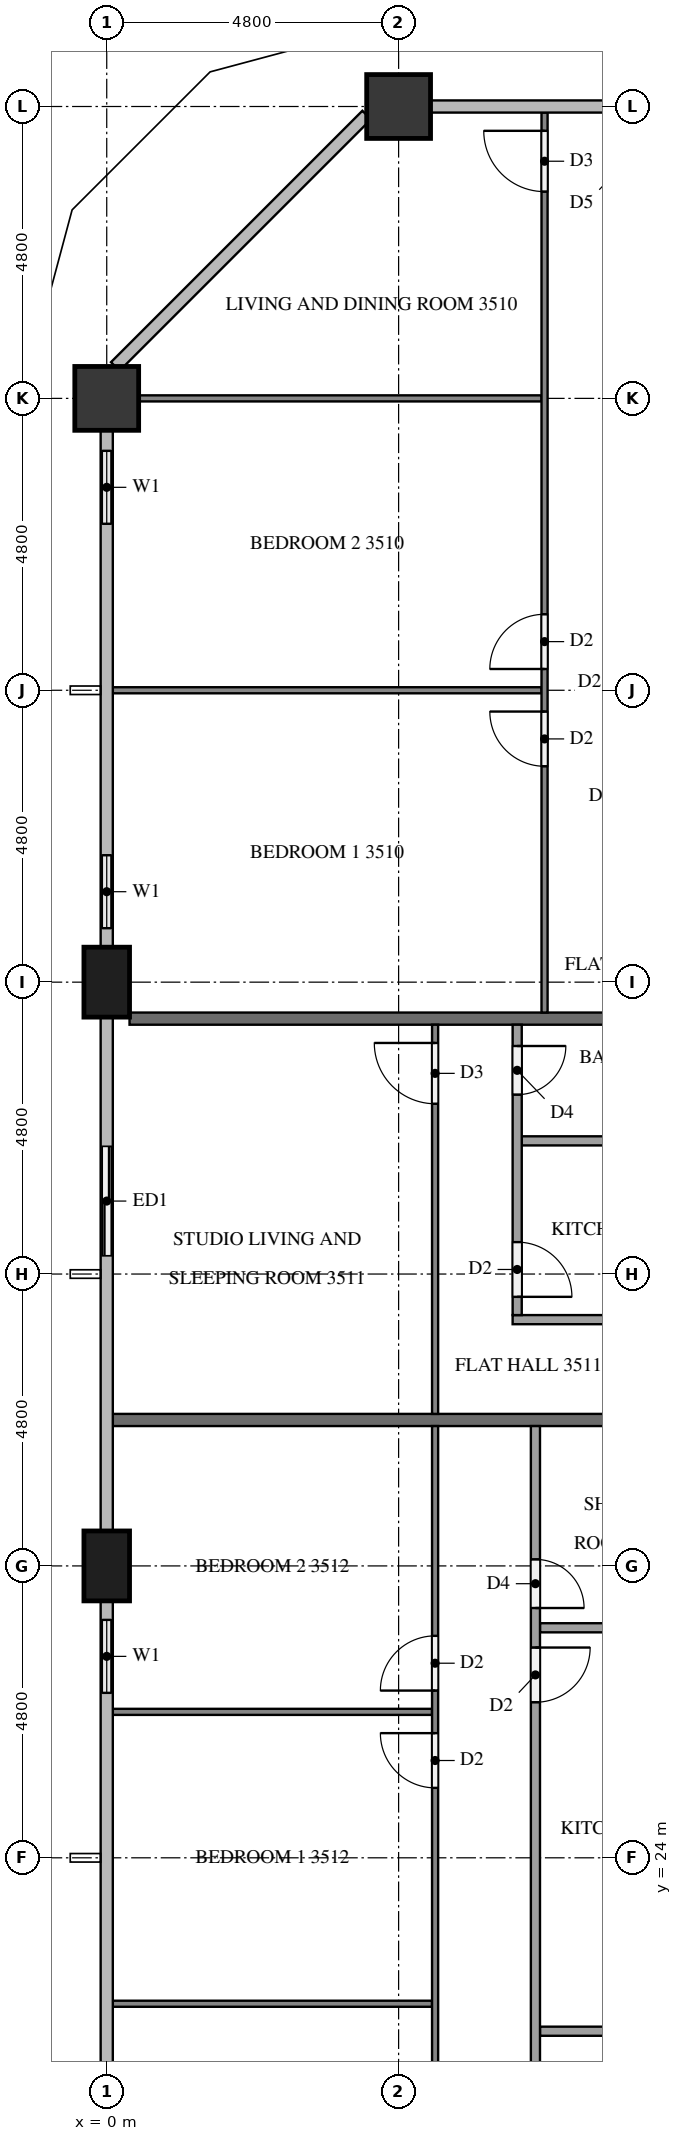
"""IFC4 building model, lengths in metres.
Left out: names, types, materials, properties, quantities, classifications, styles, units other than length and angle.
Written with IfcOpenShell. Run it as: python <this file> out.ifc"""

import sys

from ifc_helpers import new_model, si_unit, direction, frame, frame_2d, origin, origin_2d, place, context, subcontext, project, spatial, rectangle, extrude, element, fill, save


model = new_model("IFC4")
c1 = context("Model", 3, precision=1e-05, world=origin(), true_north=direction((0.0, 1.0)))
c2 = subcontext(c1, "Body", "Model", "MODEL_VIEW")
j1 = project(units=[si_unit("LENGTHUNIT", "METRE"), si_unit("PLANEANGLEUNIT", "RADIAN")], contexts=[c1])
p1 = place(None, origin())
s1 = spatial("IfcSite", under=j1, at=p1, CompositionType="ELEMENT")
p2 = place(p1, origin())
s2 = spatial("IfcBuilding", under=s1, at=p2, CompositionType="ELEMENT")
p3 = place(p2, frame((0.0, 0.0, 136.6)))
s3 = spatial("IfcBuildingStorey", under=s2, at=p3, CompositionType="ELEMENT", Elevation=136.6)
for number, where, z_axis, x_axis in (
    (1, (4.8, 52.8, 0.0), (0.0, 0.0, 1.0), (1.0, 0.0, 0.0)),
    (2, (0.0, 48.0, 0.0), (0.0, 0.0, 1.0), (1.0, 0.0, 0.0)),
):
    element("IfcColumn", number, at=place(p3, frame(where, z_axis=z_axis, x_axis=x_axis)), inside=s3, PredefinedType="COLUMN", context=c2, shape_type="SweptSolid", body=[
        extrude(rectangle(XDim=1.05, YDim=1.05, at=origin_2d()), origin(), (0.0, 0.0, 1.0), 3.2),
    ])
for number, where, z_axis, x_axis in (
    (3, (0.0, 38.4, 0.0), (0.0, 0.0, 1.0), (0.0, 1.0, 0.0)),
    (4, (0.0, 28.8, 0.0), (0.0, 0.0, 1.0), (0.0, 1.0, 0.0)),
):
    element("IfcColumn", number, at=place(p3, frame(where, z_axis=z_axis, x_axis=x_axis)), inside=s3, PredefinedType="COLUMN", context=c2, shape_type="SweptSolid", body=[
        extrude(rectangle(XDim=1.15, YDim=0.75, at=origin_2d()), origin(), (0.0, 0.0, 1.0), 3.2),
    ])
p4 = place(p3, frame((0.0, 47.475, 0.0), z_axis=(0.0, 0.0, 1.0), x_axis=(0.0, -1.0, 0.0)))
e5 = element("IfcWall", 5, at=p4, inside=s3, PredefinedType="SOLIDWALL", context=c2, shape_type="SweptSolid", body=[
    extrude(rectangle(XDim=1.875, YDim=0.15, at=frame_2d((0.938, 0.0))), origin(), (0.0, 0.0, 1.0), 3.2),
])
p5 = place(p4, frame((0.337, 0.0, 0.9)))
e6 = element("IfcOpeningElement", 6, at=p5, cuts=e5, PredefinedType="OPENING", context=c2, shape_type="SweptSolid", body=[
    extrude(rectangle(XDim=1.2, YDim=1.4, at=frame_2d((0.6, 0.7))), frame((0.0, 0.085, 0.0), z_axis=(0.0, -1.0, 0.0), x_axis=(1.0, 0.0, 0.0)), (0.0, 0.0, 1.0), 0.17),
])
p6 = place(p3, frame((0.0, 40.8, 0.0), z_axis=(0.0, 0.0, 1.0), x_axis=(0.0, -1.0, 0.0)))
e7 = element("IfcWall", 7, at=p6, inside=s3, PredefinedType="SOLIDWALL", context=c2, shape_type="SweptSolid", body=[
    extrude(rectangle(XDim=1.825, YDim=0.15, at=frame_2d((0.913, 0.0))), origin(), (0.0, 0.0, 1.0), 3.2),
])
p7 = place(p6, frame((0.312, 0.0, 0.9)))
e8 = element("IfcOpeningElement", 8, at=p7, cuts=e7, PredefinedType="OPENING", context=c2, shape_type="SweptSolid", body=[
    extrude(rectangle(XDim=1.2, YDim=1.4, at=frame_2d((0.6, 0.7))), frame((0.0, 0.085, 0.0), z_axis=(0.0, -1.0, 0.0), x_axis=(1.0, 0.0, 0.0)), (0.0, 0.0, 1.0), 0.17),
])
p8 = place(p3, frame((0.0, 36.0, 0.0), z_axis=(0.0, 0.0, 1.0), x_axis=(0.0, -1.0, 0.0)))
e9 = element("IfcWall", 9, at=p8, inside=s3, PredefinedType="SOLIDWALL", context=c2, shape_type="SweptSolid", body=[
    extrude(rectangle(XDim=2.4, YDim=0.15, at=frame_2d((1.2, 0.0))), origin(), (0.0, 0.0, 1.0), 3.2),
])
p9 = place(p8, frame((0.3, 0.0, 0.0)))
e10 = element("IfcOpeningElement", 10, at=p9, cuts=e9, PredefinedType="OPENING", context=c2, shape_type="SweptSolid", body=[
    extrude(rectangle(XDim=1.8, YDim=2.4, at=frame_2d((0.9, 1.2))), frame((0.0, 0.085, 0.0), z_axis=(0.0, -1.0, 0.0), x_axis=(1.0, 0.0, 0.0)), (0.0, 0.0, 1.0), 0.17),
])
p10 = place(p3, frame((0.0, 28.225, 0.0), z_axis=(0.0, 0.0, 1.0), x_axis=(0.0, -1.0, 0.0)))
e11 = element("IfcWall", 11, at=p10, inside=s3, PredefinedType="SOLIDWALL", context=c2, shape_type="SweptSolid", body=[
    extrude(rectangle(XDim=1.825, YDim=0.15, at=frame_2d((0.913, 0.0))), origin(), (0.0, 0.0, 1.0), 3.2),
])
p11 = place(p10, frame((0.312, 0.0, 0.9)))
e12 = element("IfcOpeningElement", 12, at=p11, cuts=e11, PredefinedType="OPENING", context=c2, shape_type="SweptSolid", body=[
    extrude(rectangle(XDim=1.2, YDim=1.4, at=frame_2d((0.6, 0.7))), frame((0.0, 0.085, 0.0), z_axis=(0.0, -1.0, 0.0), x_axis=(1.0, 0.0, 0.0)), (0.0, 0.0, 1.0), 0.17),
])
p12 = place(p3, frame((0.375, 37.8, 0.0), z_axis=(0.0, 0.0, 1.0), x_axis=(1.0, 0.0, 0.0)))
e13 = element("IfcWall", 13, at=p12, inside=s3, PredefinedType="PARTITIONING", context=c2, shape_type="SweptSolid", body=[
    extrude(rectangle(XDim=9.525, YDim=0.2, at=frame_2d((4.762, 0.0))), origin(), (0.0, 0.0, 1.0), 3.2),
])
p13 = place(p3, frame((0.1, 31.2, 0.0), z_axis=(0.0, 0.0, 1.0), x_axis=(1.0, 0.0, 0.0)))
e14 = element("IfcWall", 14, at=p13, inside=s3, PredefinedType="PARTITIONING", context=c2, shape_type="SweptSolid", body=[
    extrude(rectangle(XDim=9.8, YDim=0.2, at=frame_2d((4.9, 0.0))), origin(), (0.0, 0.0, 1.0), 3.2),
])
p14 = place(p3, frame((7.15, 43.2, 0.0), z_axis=(0.0, 0.0, 1.0), x_axis=(-1.0, 0.0, 0.0)))
e15 = element("IfcWall", 15, at=p14, inside=s3, PredefinedType="PARTITIONING", context=c2, shape_type="SweptSolid", body=[
    extrude(rectangle(XDim=7.05, YDim=0.1, at=frame_2d((3.525, 0.0))), origin(), (0.0, 0.0, 1.0), 3.2),
])
p15 = place(p3, frame((7.15, 48.0, 0.0), z_axis=(0.0, 0.0, 1.0), x_axis=(-1.0, 0.0, 0.0)))
e16 = element("IfcWall", 16, at=p15, inside=s3, PredefinedType="PARTITIONING", context=c2, shape_type="SweptSolid", body=[
    extrude(rectangle(XDim=6.625, YDim=0.1, at=frame_2d((3.312, 0.0))), origin(), (0.0, 0.0, 1.0), 3.2),
])
p16 = place(p3, frame((7.2, 37.9, 0.0), z_axis=(0.0, 0.0, 1.0), x_axis=(0.0, 1.0, 0.0)))
e17 = element("IfcWall", 17, at=p16, inside=s3, PredefinedType="PARTITIONING", context=c2, shape_type="SweptSolid", body=[
    extrude(rectangle(XDim=14.8, YDim=0.1, at=frame_2d((7.4, 0.0))), origin(), (0.0, 0.0, 1.0), 3.2),
])
p17 = place(p16, frame((4.05, 0.0, 0.0)))
e18 = element("IfcOpeningElement", 18, at=p17, cuts=e17, PredefinedType="OPENING", context=c2, shape_type="SweptSolid", body=[
    extrude(rectangle(XDim=0.9, YDim=2.1, at=frame_2d((0.45, 1.05))), frame((0.0, 0.06, 0.0), z_axis=(0.0, -1.0, 0.0), x_axis=(1.0, 0.0, 0.0)), (0.0, 0.0, 1.0), 0.12),
])
p18 = place(p16, frame((5.65, 0.0, 0.0)))
e19 = element("IfcOpeningElement", 19, at=p18, cuts=e17, PredefinedType="OPENING", context=c2, shape_type="SweptSolid", body=[
    extrude(rectangle(XDim=0.9, YDim=2.1, at=frame_2d((0.45, 1.05))), frame((0.0, 0.06, 0.0), z_axis=(0.0, -1.0, 0.0), x_axis=(1.0, 0.0, 0.0)), (0.0, 0.0, 1.0), 0.12),
])
p19 = place(p16, frame((13.5, 0.0, 0.0)))
e20 = element("IfcOpeningElement", 20, at=p19, cuts=e17, PredefinedType="OPENING", context=c2, shape_type="SweptSolid", body=[
    extrude(rectangle(XDim=1.0, YDim=2.1, at=frame_2d((0.5, 1.05))), frame((0.0, 0.06, 0.0), z_axis=(0.0, -1.0, 0.0), x_axis=(1.0, 0.0, 0.0)), (0.0, 0.0, 1.0), 0.12),
])
p20 = place(p3, frame((5.4, 31.3, 0.0), z_axis=(0.0, 0.0, 1.0), x_axis=(0.0, 1.0, 0.0)))
e21 = element("IfcWall", 21, at=p20, inside=s3, PredefinedType="PARTITIONING", context=c2, shape_type="SweptSolid", body=[
    extrude(rectangle(XDim=6.4, YDim=0.1, at=frame_2d((3.2, 0.0))), origin(), (0.0, 0.0, 1.0), 3.2),
])
p21 = place(p20, frame((5.1, 0.0, 0.0)))
e22 = element("IfcOpeningElement", 22, at=p21, cuts=e21, PredefinedType="OPENING", context=c2, shape_type="SweptSolid", body=[
    extrude(rectangle(XDim=1.0, YDim=2.1, at=frame_2d((0.5, 1.05))), frame((0.0, 0.06, 0.0), z_axis=(0.0, -1.0, 0.0), x_axis=(1.0, 0.0, 0.0)), (0.0, 0.0, 1.0), 0.12),
])
p22 = place(p3, frame((9.9, 35.79, 0.0), z_axis=(0.0, 0.0, 1.0), x_axis=(-1.0, 0.0, 0.0)))
e23 = element("IfcWall", 23, at=p22, inside=s3, PredefinedType="PARTITIONING", context=c2, shape_type="SweptSolid", body=[
    extrude(rectangle(XDim=3.075, YDim=0.15, at=frame_2d((1.538, 0.0))), origin(), (0.0, 0.0, 1.0), 3.2),
])
p23 = place(p3, frame((9.9, 32.85, 0.0), z_axis=(0.0, 0.0, 1.0), x_axis=(-1.0, 0.0, 0.0)))
e24 = element("IfcWall", 24, at=p23, inside=s3, PredefinedType="PARTITIONING", context=c2, shape_type="SweptSolid", body=[
    extrude(rectangle(XDim=3.225, YDim=0.15, at=frame_2d((1.612, 0.0))), origin(), (0.0, 0.0, 1.0), 3.2),
])
p24 = place(p3, frame((6.75, 37.7, 0.0), z_axis=(0.0, 0.0, 1.0), x_axis=(0.0, -1.0, 0.0)))
e25 = element("IfcWall", 25, at=p24, inside=s3, PredefinedType="PARTITIONING", context=c2, shape_type="SweptSolid", body=[
    extrude(rectangle(XDim=4.775, YDim=0.15, at=frame_2d((2.387, 0.0))), origin(), (0.0, 0.0, 1.0), 3.2),
])
p25 = place(p24, frame((3.575, 0.0, 0.0)))
e26 = element("IfcOpeningElement", 26, at=p25, cuts=e25, PredefinedType="OPENING", context=c2, shape_type="SweptSolid", body=[
    extrude(rectangle(XDim=0.9, YDim=2.1, at=frame_2d((0.45, 1.05))), frame((0.0, 0.085, 0.0), z_axis=(0.0, -1.0, 0.0), x_axis=(1.0, 0.0, 0.0)), (0.0, 0.0, 1.0), 0.17),
])
p26 = place(p24, frame((0.35, 0.0, 0.0)))
e27 = element("IfcOpeningElement", 27, at=p26, cuts=e25, PredefinedType="OPENING", context=c2, shape_type="SweptSolid", body=[
    extrude(rectangle(XDim=0.8, YDim=2.1, at=frame_2d((0.4, 1.05))), frame((0.0, 0.085, 0.0), z_axis=(0.0, -1.0, 0.0), x_axis=(1.0, 0.0, 0.0)), (0.0, 0.0, 1.0), 0.17),
])
for number, where, z_axis, x_axis in (
    (28, (5.35, 21.6, 0.0), (0.0, 0.0, 1.0), (-1.0, 0.0, 0.0)),
    (29, (5.35, 26.4, 0.0), (0.0, 0.0, 1.0), (-1.0, 0.0, 0.0)),
):
    element("IfcWall", number, at=place(p3, frame(where, z_axis=z_axis, x_axis=x_axis)), inside=s3, PredefinedType="PARTITIONING", context=c2, shape_type="SweptSolid", body=[
        extrude(rectangle(XDim=5.25, YDim=0.1, at=frame_2d((2.625, 0.0))), origin(), (0.0, 0.0, 1.0), 3.2),
    ])
p27 = place(p3, frame((5.4, 15.1, 0.0), z_axis=(0.0, 0.0, 1.0), x_axis=(0.0, 1.0, 0.0)))
e30 = element("IfcWall", 30, at=p27, inside=s3, PredefinedType="PARTITIONING", context=c2, shape_type="SweptSolid", body=[
    extrude(rectangle(XDim=16.0, YDim=0.1, at=frame_2d((8.0, 0.0))), origin(), (0.0, 0.0, 1.0), 3.2),
])
p28 = place(p27, frame((0.3, 0.0, 0.0)))
e31 = element("IfcOpeningElement", 31, at=p28, cuts=e30, PredefinedType="OPENING", context=c2, shape_type="SweptSolid", body=[
    extrude(rectangle(XDim=1.0, YDim=2.1, at=frame_2d((0.5, 1.05))), frame((0.0, 0.06, 0.0), z_axis=(0.0, -1.0, 0.0), x_axis=(1.0, 0.0, 0.0)), (0.0, 0.0, 1.0), 0.12),
])
p29 = place(p27, frame((10.05, 0.0, 0.0)))
e32 = element("IfcOpeningElement", 32, at=p29, cuts=e30, PredefinedType="OPENING", context=c2, shape_type="SweptSolid", body=[
    extrude(rectangle(XDim=0.9, YDim=2.1, at=frame_2d((0.45, 1.05))), frame((0.0, 0.06, 0.0), z_axis=(0.0, -1.0, 0.0), x_axis=(1.0, 0.0, 0.0)), (0.0, 0.0, 1.0), 0.12),
])
p30 = place(p27, frame((11.65, 0.0, 0.0)))
e33 = element("IfcOpeningElement", 33, at=p30, cuts=e30, PredefinedType="OPENING", context=c2, shape_type="SweptSolid", body=[
    extrude(rectangle(XDim=0.9, YDim=2.1, at=frame_2d((0.45, 1.05))), frame((0.0, 0.06, 0.0), z_axis=(0.0, -1.0, 0.0), x_axis=(1.0, 0.0, 0.0)), (0.0, 0.0, 1.0), 0.12),
])
for number, where, z_axis, x_axis in (
    (34, (9.9, 21.148, 0.0), (0.0, 0.0, 1.0), (-1.0, 0.0, 0.0)),
    (35, (9.9, 27.783, 0.0), (0.0, 0.0, 1.0), (-1.0, 0.0, 0.0)),
):
    element("IfcWall", number, at=place(p3, frame(where, z_axis=z_axis, x_axis=x_axis)), inside=s3, PredefinedType="PARTITIONING", context=c2, shape_type="SweptSolid", body=[
        extrude(rectangle(XDim=2.775, YDim=0.15, at=frame_2d((1.387, 0.0))), origin(), (0.0, 0.0, 1.0), 3.2),
    ])
p31 = place(p3, frame((7.05, 31.1, 0.0), z_axis=(0.0, 0.0, 1.0), x_axis=(0.0, -1.0, 0.0)))
e36 = element("IfcWall", 36, at=p31, inside=s3, PredefinedType="PARTITIONING", context=c2, shape_type="SweptSolid", body=[
    extrude(rectangle(XDim=14.375, YDim=0.15, at=frame_2d((7.188, 0.0))), origin(), (0.0, 0.0, 1.0), 3.2),
])
p32 = place(p31, frame((13.175, 0.0, 0.0)))
e37 = element("IfcOpeningElement", 37, at=p32, cuts=e36, PredefinedType="OPENING", context=c2, shape_type="SweptSolid", body=[
    extrude(rectangle(XDim=0.9, YDim=2.1, at=frame_2d((0.45, 1.05))), frame((0.0, 0.085, 0.0), z_axis=(0.0, -1.0, 0.0), x_axis=(1.0, 0.0, 0.0)), (0.0, 0.0, 1.0), 0.17),
])
p33 = place(p31, frame((3.642, 0.0, 0.0)))
e38 = element("IfcOpeningElement", 38, at=p33, cuts=e36, PredefinedType="OPENING", context=c2, shape_type="SweptSolid", body=[
    extrude(rectangle(XDim=0.9, YDim=2.1, at=frame_2d((0.45, 1.05))), frame((0.0, 0.085, 0.0), z_axis=(0.0, -1.0, 0.0), x_axis=(1.0, 0.0, 0.0)), (0.0, 0.0, 1.0), 0.17),
])
p34 = place(p31, frame((2.192, 0.0, 0.0)))
e39 = element("IfcOpeningElement", 39, at=p34, cuts=e36, PredefinedType="OPENING", context=c2, shape_type="SweptSolid", body=[
    extrude(rectangle(XDim=0.8, YDim=2.1, at=frame_2d((0.4, 1.05))), frame((0.0, 0.085, 0.0), z_axis=(0.0, -1.0, 0.0), x_axis=(1.0, 0.0, 0.0)), (0.0, 0.0, 1.0), 0.17),
])
p35 = place(p5, origin())
e40 = element("IfcWindow", 40, at=p35, inside=s3, PartitioningType="SINGLE_PANEL", PredefinedType="WINDOW", context=c2, shape_type="SweptSolid", body=[
    extrude(rectangle(XDim=1.2, YDim=1.4, at=frame_2d((0.6, 0.7))), frame((0.0, 0.03, 0.0), z_axis=(0.0, -1.0, 0.0), x_axis=(1.0, 0.0, 0.0)), (0.0, 0.0, 1.0), 0.06),
])
fill(e6, e40)
p36 = place(p7, origin())
e41 = element("IfcWindow", 41, at=p36, inside=s3, PartitioningType="SINGLE_PANEL", PredefinedType="WINDOW", context=c2, shape_type="SweptSolid", body=[
    extrude(rectangle(XDim=1.2, YDim=1.4, at=frame_2d((0.6, 0.7))), frame((0.0, 0.03, 0.0), z_axis=(0.0, -1.0, 0.0), x_axis=(1.0, 0.0, 0.0)), (0.0, 0.0, 1.0), 0.06),
])
fill(e8, e41)
p37 = place(p9, origin())
e42 = element("IfcDoor", 42, at=p37, inside=s3, OperationType="SLIDING_TO_LEFT", PredefinedType="DOOR", context=c2, shape_type="SweptSolid", body=[
    extrude(rectangle(XDim=1.8, YDim=2.4, at=frame_2d((0.9, 1.2))), frame((0.0, 0.025, 0.0), z_axis=(0.0, -1.0, 0.0), x_axis=(1.0, 0.0, 0.0)), (0.0, 0.0, 1.0), 0.05),
])
fill(e10, e42)
p38 = place(p11, origin())
e43 = element("IfcWindow", 43, at=p38, inside=s3, PartitioningType="SINGLE_PANEL", PredefinedType="WINDOW", context=c2, shape_type="SweptSolid", body=[
    extrude(rectangle(XDim=1.2, YDim=1.4, at=frame_2d((0.6, 0.7))), frame((0.0, 0.03, 0.0), z_axis=(0.0, -1.0, 0.0), x_axis=(1.0, 0.0, 0.0)), (0.0, 0.0, 1.0), 0.06),
])
fill(e12, e43)
p39 = place(p17, origin())
e44 = element("IfcDoor", 44, at=p39, inside=s3, OperationType="SINGLE_SWING_RIGHT", PredefinedType="DOOR", context=c2, shape_type="SweptSolid", body=[
    extrude(rectangle(XDim=0.9, YDim=2.1, at=frame_2d((0.45, 1.05))), frame((0.0, 0.025, 0.0), z_axis=(0.0, -1.0, 0.0), x_axis=(1.0, 0.0, 0.0)), (0.0, 0.0, 1.0), 0.05),
])
fill(e18, e44)
p40 = place(p18, origin())
e45 = element("IfcDoor", 45, at=p40, inside=s3, OperationType="SINGLE_SWING_LEFT", PredefinedType="DOOR", context=c2, shape_type="SweptSolid", body=[
    extrude(rectangle(XDim=0.9, YDim=2.1, at=frame_2d((0.45, 1.05))), frame((0.0, 0.025, 0.0), z_axis=(0.0, -1.0, 0.0), x_axis=(1.0, 0.0, 0.0)), (0.0, 0.0, 1.0), 0.05),
])
fill(e19, e45)
p41 = place(p19, origin())
e46 = element("IfcDoor", 46, at=p41, inside=s3, OperationType="SINGLE_SWING_RIGHT", PredefinedType="DOOR", context=c2, shape_type="SweptSolid", body=[
    extrude(rectangle(XDim=1.0, YDim=2.1, at=frame_2d((0.5, 1.05))), frame((0.0, 0.025, 0.0), z_axis=(0.0, -1.0, 0.0), x_axis=(1.0, 0.0, 0.0)), (0.0, 0.0, 1.0), 0.05),
])
fill(e20, e46)
p42 = place(p21, origin())
e47 = element("IfcDoor", 47, at=p42, inside=s3, OperationType="SINGLE_SWING_RIGHT", PredefinedType="DOOR", context=c2, shape_type="SweptSolid", body=[
    extrude(rectangle(XDim=1.0, YDim=2.1, at=frame_2d((0.5, 1.05))), frame((0.0, 0.025, 0.0), z_axis=(0.0, -1.0, 0.0), x_axis=(1.0, 0.0, 0.0)), (0.0, 0.0, 1.0), 0.05),
])
fill(e22, e47)
p43 = place(p25, origin())
e48 = element("IfcDoor", 48, at=p43, inside=s3, OperationType="SINGLE_SWING_RIGHT", PredefinedType="DOOR", context=c2, shape_type="SweptSolid", body=[
    extrude(rectangle(XDim=0.9, YDim=2.1, at=frame_2d((0.45, 1.05))), frame((0.0, 0.025, 0.0), z_axis=(0.0, -1.0, 0.0), x_axis=(1.0, 0.0, 0.0)), (0.0, 0.0, 1.0), 0.05),
])
fill(e26, e48)
p44 = place(p26, origin())
e49 = element("IfcDoor", 49, at=p44, inside=s3, OperationType="SINGLE_SWING_LEFT", PredefinedType="DOOR", context=c2, shape_type="SweptSolid", body=[
    extrude(rectangle(XDim=0.8, YDim=2.1, at=frame_2d((0.4, 1.05))), frame((0.0, 0.025, 0.0), z_axis=(0.0, -1.0, 0.0), x_axis=(1.0, 0.0, 0.0)), (0.0, 0.0, 1.0), 0.05),
])
fill(e27, e49)
p45 = place(p29, origin())
e50 = element("IfcDoor", 50, at=p45, inside=s3, OperationType="SINGLE_SWING_RIGHT", PredefinedType="DOOR", context=c2, shape_type="SweptSolid", body=[
    extrude(rectangle(XDim=0.9, YDim=2.1, at=frame_2d((0.45, 1.05))), frame((0.0, 0.025, 0.0), z_axis=(0.0, -1.0, 0.0), x_axis=(1.0, 0.0, 0.0)), (0.0, 0.0, 1.0), 0.05),
])
fill(e32, e50)
p46 = place(p30, origin())
e51 = element("IfcDoor", 51, at=p46, inside=s3, OperationType="SINGLE_SWING_LEFT", PredefinedType="DOOR", context=c2, shape_type="SweptSolid", body=[
    extrude(rectangle(XDim=0.9, YDim=2.1, at=frame_2d((0.45, 1.05))), frame((0.0, 0.025, 0.0), z_axis=(0.0, -1.0, 0.0), x_axis=(1.0, 0.0, 0.0)), (0.0, 0.0, 1.0), 0.05),
])
fill(e33, e51)
p47 = place(p33, origin())
e52 = element("IfcDoor", 52, at=p47, inside=s3, OperationType="SINGLE_SWING_LEFT", PredefinedType="DOOR", context=c2, shape_type="SweptSolid", body=[
    extrude(rectangle(XDim=0.9, YDim=2.1, at=frame_2d((0.45, 1.05))), frame((0.0, 0.025, 0.0), z_axis=(0.0, -1.0, 0.0), x_axis=(1.0, 0.0, 0.0)), (0.0, 0.0, 1.0), 0.05),
])
fill(e38, e52)
p48 = place(p34, origin())
e53 = element("IfcDoor", 53, at=p48, inside=s3, OperationType="SINGLE_SWING_RIGHT", PredefinedType="DOOR", context=c2, shape_type="SweptSolid", body=[
    extrude(rectangle(XDim=0.8, YDim=2.1, at=frame_2d((0.4, 1.05))), frame((0.0, 0.025, 0.0), z_axis=(0.0, -1.0, 0.0), x_axis=(1.0, 0.0, 0.0)), (0.0, 0.0, 1.0), 0.05),
])
fill(e39, e53)
save(model, sys.argv[1])
